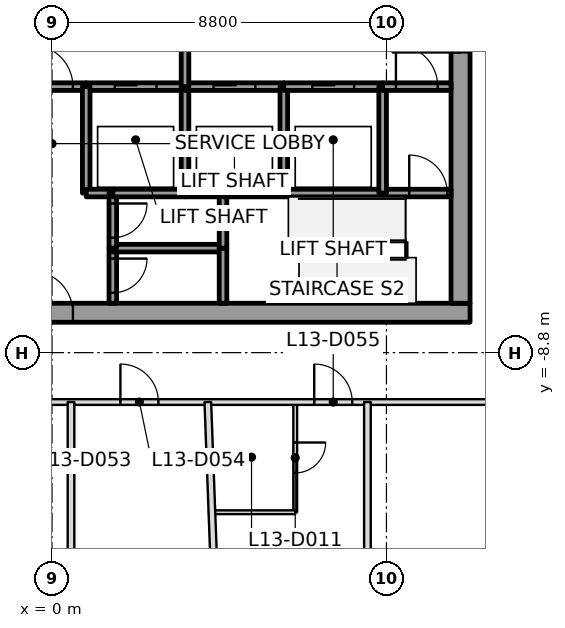
"""IFC4 building model, lengths in metres.
Left out: names, types, materials, properties, quantities, classifications, styles, units other than length and angle.
Written with IfcOpenShell. Run it as: python <this file> out.ifc"""

import sys

from ifc_helpers import new_model, si_unit, direction, frame, frame_2d, origin, place, context, subcontext, project, spatial, rectangle, extrude, element, fill, save


model = new_model("IFC4")
c1 = context("Model", 3, precision=1e-05, world=origin(), true_north=direction((0.0, 1.0)))
c2 = subcontext(c1, "Body", "Model", "MODEL_VIEW")
j1 = project(units=[si_unit("LENGTHUNIT", "METRE"), si_unit("PLANEANGLEUNIT", "RADIAN")], contexts=[c1])
p1 = place(None, origin())
s1 = spatial("IfcSite", under=j1, at=p1, CompositionType="ELEMENT")
p2 = place(p1, origin())
s2 = spatial("IfcBuilding", under=s1, at=p2, CompositionType="ELEMENT")
p3 = place(p2, frame((0.0, 0.0, 70.2)))
s3 = spatial("IfcBuildingStorey", under=s2, at=p3, CompositionType="ELEMENT", Elevation=70.2)
p4 = place(p3, frame((-11.0, -7.75, 0.0), z_axis=(0.0, 0.0, 1.0), x_axis=(1.0, 0.0, 0.0)))
e1 = element("IfcWall", 1, at=p4, inside=s3, PredefinedType="SHEAR", context=c2, shape_type="SweptSolid", body=[
    extrude(rectangle(XDim=22.0, YDim=0.5, at=frame_2d((11.0, 0.0))), origin(), (0.0, 0.0, 1.0), 3.7),
])
p5 = place(p4, frame((10.45, 0.0, 0.0)))
e2 = element("IfcOpeningElement", 2, at=p5, cuts=e1, PredefinedType="OPENING", context=c2, shape_type="SweptSolid", body=[
    extrude(rectangle(XDim=1.1, YDim=2.1, at=frame_2d((0.55, 1.05))), frame((0.0, 0.25, 0.0), z_axis=(0.0, -1.0, 0.0), x_axis=(1.0, 0.0, 0.0)), (0.0, 0.0, 1.0), 0.5),
])
p6 = place(p3, frame((10.75, -7.5, 0.0), z_axis=(0.0, 0.0, 1.0), x_axis=(0.0, 1.0, 0.0)))
e3 = element("IfcWall", 3, at=p6, inside=s3, PredefinedType="SHEAR", context=c2, shape_type="SweptSolid", body=[
    extrude(rectangle(XDim=15.0, YDim=0.5, at=frame_2d((7.5, 0.0))), origin(), (0.0, 0.0, 1.0), 3.7),
])
p7 = place(p6, frame((6.6, 0.0, 0.0)))
e4 = element("IfcOpeningElement", 4, at=p7, cuts=e3, PredefinedType="OPENING", context=c2, shape_type="SweptSolid", body=[
    extrude(rectangle(XDim=1.8, YDim=2.1, at=frame_2d((0.9, 1.05))), frame((0.0, 0.25, 0.0), z_axis=(0.0, -1.0, 0.0), x_axis=(1.0, 0.0, 0.0)), (0.0, 0.0, 1.0), 0.5),
])
p8 = place(p3, frame((-0.9, -1.8, 0.0), z_axis=(0.0, 0.0, 1.0), x_axis=(1.0, 0.0, 0.0)))
e5 = element("IfcWall", 5, at=p8, inside=s3, PredefinedType="SOLIDWALL", context=c2, shape_type="SweptSolid", body=[
    extrude(rectangle(XDim=1.8, YDim=0.2, at=frame_2d((0.9, 0.0))), origin(), (0.0, 0.0, 1.0), 3.55),
])
p9 = place(p8, frame((0.35, 0.0, 0.0)))
e6 = element("IfcOpeningElement", 6, at=p9, cuts=e5, PredefinedType="OPENING", context=c2, shape_type="SweptSolid", body=[
    extrude(rectangle(XDim=1.1, YDim=2.1, at=frame_2d((0.55, 1.05))), frame((0.0, 0.1, 0.0), z_axis=(0.0, -1.0, 0.0), x_axis=(1.0, 0.0, 0.0)), (0.0, 0.0, 1.0), 0.2),
])
p10 = place(p3, frame((0.9, -1.8, 0.0), z_axis=(0.0, 0.0, 1.0), x_axis=(1.0, 0.0, 0.0)))
e7 = element("IfcWall", 7, at=p10, inside=s3, PredefinedType="SOLIDWALL", context=c2, shape_type="SweptSolid", body=[
    extrude(rectangle(XDim=2.6, YDim=0.2, at=frame_2d((1.3, 0.0))), origin(), (0.0, 0.0, 1.0), 3.55),
])
p11 = place(p10, frame((0.75, 0.0, 0.0)))
e8 = element("IfcOpeningElement", 8, at=p11, cuts=e7, PredefinedType="OPENING", context=c2, shape_type="SweptSolid", body=[
    extrude(rectangle(XDim=1.1, YDim=2.1, at=frame_2d((0.55, 1.05))), frame((0.0, 0.1, 0.0), z_axis=(0.0, -1.0, 0.0), x_axis=(1.0, 0.0, 0.0)), (0.0, 0.0, 1.0), 0.2),
])
p12 = place(p3, frame((0.9, -1.8, 0.0), z_axis=(0.0, 0.0, 1.0), x_axis=(0.0, -1.0, 0.0)))
e9 = element("IfcWall", 9, at=p12, inside=s3, PredefinedType="SOLIDWALL", context=c2, shape_type="SweptSolid", body=[
    extrude(rectangle(XDim=2.8, YDim=0.2, at=frame_2d((1.4, 0.0))), origin(), (0.0, 0.0, 1.0), 3.55),
])
p13 = place(p3, frame((0.9, -4.6, 0.0), z_axis=(0.0, 0.0, 1.0), x_axis=(1.0, 0.0, 0.0)))
e10 = element("IfcWall", 10, at=p13, inside=s3, PredefinedType="SOLIDWALL", context=c2, shape_type="SweptSolid", body=[
    extrude(rectangle(XDim=0.7, YDim=0.2, at=frame_2d((0.35, 0.0))), origin(), (0.0, 0.0, 1.0), 3.55),
])
p14 = place(p3, frame((1.6, -6.05, 0.0), z_axis=(0.0, 0.0, 1.0), x_axis=(0.0, -1.0, 0.0)))
e11 = element("IfcWall", 11, at=p14, inside=s3, PredefinedType="SOLIDWALL", context=c2, shape_type="SweptSolid", body=[
    extrude(rectangle(XDim=1.45, YDim=0.2, at=frame_2d((0.725, 0.0))), origin(), (0.0, 0.0, 1.0), 3.55),
])
p15 = place(p14, frame((0.275, 0.0, 0.0)))
e12 = element("IfcOpeningElement", 12, at=p15, cuts=e11, PredefinedType="OPENING", context=c2, shape_type="SweptSolid", body=[
    extrude(rectangle(XDim=0.9, YDim=2.1, at=frame_2d((0.45, 1.05))), frame((0.0, 0.1, 0.0), z_axis=(0.0, -1.0, 0.0), x_axis=(1.0, 0.0, 0.0)), (0.0, 0.0, 1.0), 0.2),
])
p16 = place(p3, frame((4.5, -6.05, 0.0), z_axis=(0.0, 0.0, 1.0), x_axis=(-1.0, 0.0, 0.0)))
e13 = element("IfcWall", 13, at=p16, inside=s3, PredefinedType="SOLIDWALL", context=c2, shape_type="SweptSolid", body=[
    extrude(rectangle(XDim=2.9, YDim=0.2, at=frame_2d((1.45, 0.0))), origin(), (0.0, 0.0, 1.0), 3.55),
])
p17 = place(p3, frame((1.6, -4.6, 0.0), z_axis=(0.0, 0.0, 1.0), x_axis=(0.0, -1.0, 0.0)))
e14 = element("IfcWall", 14, at=p17, inside=s3, PredefinedType="SOLIDWALL", context=c2, shape_type="SweptSolid", body=[
    extrude(rectangle(XDim=1.45, YDim=0.2, at=frame_2d((0.725, 0.0))), origin(), (0.0, 0.0, 1.0), 3.55),
])
p18 = place(p17, frame((0.275, 0.0, 0.0)))
e15 = element("IfcOpeningElement", 15, at=p18, cuts=e14, PredefinedType="OPENING", context=c2, shape_type="SweptSolid", body=[
    extrude(rectangle(XDim=0.9, YDim=2.1, at=frame_2d((0.45, 1.05))), frame((0.0, 0.1, 0.0), z_axis=(0.0, -1.0, 0.0), x_axis=(1.0, 0.0, 0.0)), (0.0, 0.0, 1.0), 0.2),
])
p19 = place(p3, frame((3.5, -4.6, 0.0), z_axis=(0.0, 0.0, 1.0), x_axis=(-1.0, 0.0, 0.0)))
e16 = element("IfcWall", 16, at=p19, inside=s3, PredefinedType="SOLIDWALL", context=c2, shape_type="SweptSolid", body=[
    extrude(rectangle(XDim=1.9, YDim=0.2, at=frame_2d((0.95, 0.0))), origin(), (0.0, 0.0, 1.0), 3.55),
])
p20 = place(p3, frame((4.5, -4.6, 0.0), z_axis=(0.0, 0.0, 1.0), x_axis=(-1.0, 0.0, 0.0)))
e17 = element("IfcWall", 17, at=p20, inside=s3, PredefinedType="SOLIDWALL", context=c2, shape_type="SweptSolid", body=[
    extrude(rectangle(XDim=1.0, YDim=0.2, at=frame_2d((0.5, 0.0))), origin(), (0.0, 0.0, 1.0), 3.55),
])
p21 = place(p3, frame((3.5, -4.6, 0.0), z_axis=(0.0, 0.0, 1.0), x_axis=(0.0, 1.0, 0.0)))
e18 = element("IfcWall", 18, at=p21, inside=s3, PredefinedType="SOLIDWALL", context=c2, shape_type="SweptSolid", body=[
    extrude(rectangle(XDim=2.8, YDim=0.2, at=frame_2d((1.4, 0.0))), origin(), (0.0, 0.0, 1.0), 3.55),
])
p22 = place(p3, frame((3.5, -1.8, 0.0), z_axis=(0.0, 0.0, 1.0), x_axis=(1.0, 0.0, 0.0)))
e19 = element("IfcWall", 19, at=p22, inside=s3, PredefinedType="SOLIDWALL", context=c2, shape_type="SweptSolid", body=[
    extrude(rectangle(XDim=2.6, YDim=0.2, at=frame_2d((1.3, 0.0))), origin(), (0.0, 0.0, 1.0), 3.55),
])
p23 = place(p22, frame((0.75, 0.0, 0.0)))
e20 = element("IfcOpeningElement", 20, at=p23, cuts=e19, PredefinedType="OPENING", context=c2, shape_type="SweptSolid", body=[
    extrude(rectangle(XDim=1.1, YDim=2.1, at=frame_2d((0.55, 1.05))), frame((0.0, 0.1, 0.0), z_axis=(0.0, -1.0, 0.0), x_axis=(1.0, 0.0, 0.0)), (0.0, 0.0, 1.0), 0.2),
])
p24 = place(p3, frame((3.5, -1.8, 0.0), z_axis=(0.0, 0.0, 1.0), x_axis=(0.0, 1.0, 0.0)))
e21 = element("IfcWall", 21, at=p24, inside=s3, PredefinedType="SOLIDWALL", context=c2, shape_type="SweptSolid", body=[
    extrude(rectangle(XDim=3.6, YDim=0.2, at=frame_2d((1.8, 0.0))), origin(), (0.0, 0.0, 1.0), 3.55),
])
p25 = place(p24, frame((1.05, 0.0, 0.0)))
e22 = element("IfcOpeningElement", 22, at=p25, cuts=e21, PredefinedType="OPENING", context=c2, shape_type="SweptSolid", body=[
    extrude(rectangle(XDim=1.5, YDim=2.1, at=frame_2d((0.75, 1.05))), frame((0.0, 0.1, 0.0), z_axis=(0.0, -1.0, 0.0), x_axis=(1.0, 0.0, 0.0)), (0.0, 0.0, 1.0), 0.2),
])
for number, where, z_axis, x_axis in (
    (23, (4.5, -7.5, 0.0), (0.0, 0.0, 1.0), (0.0, 1.0, 0.0)),
    (24, (4.5, -6.05, 0.0), (0.0, 0.0, 1.0), (0.0, 1.0, 0.0)),
):
    element("IfcWall", number, at=place(p3, frame(where, z_axis=z_axis, x_axis=x_axis)), inside=s3, PredefinedType="SOLIDWALL", context=c2, shape_type="SweptSolid", body=[
        extrude(rectangle(XDim=1.45, YDim=0.2, at=frame_2d((0.725, 0.0))), origin(), (0.0, 0.0, 1.0), 3.55),
    ])
p26 = place(p3, frame((4.5, -4.6, 0.0), z_axis=(0.0, 0.0, 1.0), x_axis=(1.0, 0.0, 0.0)))
e25 = element("IfcWall", 25, at=p26, inside=s3, PredefinedType="SOLIDWALL", context=c2, shape_type="SweptSolid", body=[
    extrude(rectangle(XDim=1.6, YDim=0.2, at=frame_2d((0.8, 0.0))), origin(), (0.0, 0.0, 1.0), 3.55),
])
p27 = place(p3, frame((6.1, -4.6, 0.0), z_axis=(0.0, 0.0, 1.0), x_axis=(1.0, 0.0, 0.0)))
e26 = element("IfcWall", 26, at=p27, inside=s3, PredefinedType="SOLIDWALL", context=c2, shape_type="SweptSolid", body=[
    extrude(rectangle(XDim=2.6, YDim=0.2, at=frame_2d((1.3, 0.0))), origin(), (0.0, 0.0, 1.0), 3.55),
])
p28 = place(p3, frame((6.1, -4.6, 0.0), z_axis=(0.0, 0.0, 1.0), x_axis=(0.0, 1.0, 0.0)))
e27 = element("IfcWall", 27, at=p28, inside=s3, PredefinedType="SOLIDWALL", context=c2, shape_type="SweptSolid", body=[
    extrude(rectangle(XDim=2.8, YDim=0.2, at=frame_2d((1.4, 0.0))), origin(), (0.0, 0.0, 1.0), 3.55),
])
p29 = place(p3, frame((6.1, -1.8, 0.0), z_axis=(0.0, 0.0, 1.0), x_axis=(1.0, 0.0, 0.0)))
e28 = element("IfcWall", 28, at=p29, inside=s3, PredefinedType="SOLIDWALL", context=c2, shape_type="SweptSolid", body=[
    extrude(rectangle(XDim=2.6, YDim=0.2, at=frame_2d((1.3, 0.0))), origin(), (0.0, 0.0, 1.0), 3.55),
])
p30 = place(p29, frame((0.75, 0.0, 0.0)))
e29 = element("IfcOpeningElement", 29, at=p30, cuts=e28, PredefinedType="OPENING", context=c2, shape_type="SweptSolid", body=[
    extrude(rectangle(XDim=1.1, YDim=2.1, at=frame_2d((0.55, 1.05))), frame((0.0, 0.1, 0.0), z_axis=(0.0, -1.0, 0.0), x_axis=(1.0, 0.0, 0.0)), (0.0, 0.0, 1.0), 0.2),
])
p31 = place(p3, frame((8.7, -4.6, 0.0), z_axis=(0.0, 0.0, 1.0), x_axis=(1.0, 0.0, 0.0)))
e30 = element("IfcWall", 30, at=p31, inside=s3, PredefinedType="SOLIDWALL", context=c2, shape_type="SweptSolid", body=[
    extrude(rectangle(XDim=1.8, YDim=0.2, at=frame_2d((0.9, 0.0))), origin(), (0.0, 0.0, 1.0), 3.55),
])
p32 = place(p31, frame((0.7, 0.0, 0.0)))
e31 = element("IfcOpeningElement", 31, at=p32, cuts=e30, PredefinedType="OPENING", context=c2, shape_type="SweptSolid", body=[
    extrude(rectangle(XDim=1.0, YDim=2.1, at=frame_2d((0.5, 1.05))), frame((0.0, 0.1, 0.0), z_axis=(0.0, -1.0, 0.0), x_axis=(1.0, 0.0, 0.0)), (0.0, 0.0, 1.0), 0.2),
])
p33 = place(p3, frame((8.7, -1.8, 0.0), z_axis=(0.0, 0.0, 1.0), x_axis=(0.0, -1.0, 0.0)))
e32 = element("IfcWall", 32, at=p33, inside=s3, PredefinedType="SOLIDWALL", context=c2, shape_type="SweptSolid", body=[
    extrude(rectangle(XDim=2.8, YDim=0.2, at=frame_2d((1.4, 0.0))), origin(), (0.0, 0.0, 1.0), 3.55),
])
p34 = place(p3, frame((8.7, -1.8, 0.0), z_axis=(0.0, 0.0, 1.0), x_axis=(1.0, 0.0, 0.0)))
e33 = element("IfcWall", 33, at=p34, inside=s3, PredefinedType="SOLIDWALL", context=c2, shape_type="SweptSolid", body=[
    extrude(rectangle(XDim=1.8, YDim=0.2, at=frame_2d((0.9, 0.0))), origin(), (0.0, 0.0, 1.0), 3.55),
])
p35 = place(p34, frame((0.35, 0.0, 0.0)))
e34 = element("IfcOpeningElement", 34, at=p35, cuts=e33, PredefinedType="OPENING", context=c2, shape_type="SweptSolid", body=[
    extrude(rectangle(XDim=1.1, YDim=2.1, at=frame_2d((0.55, 1.05))), frame((0.0, 0.1, 0.0), z_axis=(0.0, -1.0, 0.0), x_axis=(1.0, 0.0, 0.0)), (0.0, 0.0, 1.0), 0.2),
])
p36 = place(p3, frame((0.5, -10.1, 0.0), z_axis=(0.0, 0.0, 1.0), x_axis=(0.0, -1.0, 0.0)))
e35 = element("IfcWall", 35, at=p36, inside=s3, PredefinedType="PARTITIONING", context=c2, shape_type="SweptSolid", body=[
    extrude(rectangle(XDim=13.97, YDim=0.175, at=frame_2d((6.985, 0.0))), origin(), (0.0, 0.0, 1.0), 2.784),
])
p37 = place(p3, frame((4.604, -23.656, 0.0), z_axis=(0.0, 0.0, 1.0), x_axis=(-0.03711217874, 0.999311105807, 0.0)))
e36 = element("IfcWall", 36, at=p37, inside=s3, PredefinedType="PARTITIONING", context=c2, shape_type="SweptSolid", body=[
    extrude(rectangle(XDim=13.565, YDim=0.175, at=frame_2d((6.782, 0.0))), origin(), (0.0, 0.0, 1.0), 2.784),
])
p38 = place(p3, frame((8.3, -10.1, 0.0), z_axis=(0.0, 0.0, 1.0), x_axis=(0.0, -1.0, 0.0)))
e37 = element("IfcWall", 37, at=p38, inside=s3, PredefinedType="PARTITIONING", context=c2, shape_type="SweptSolid", body=[
    extrude(rectangle(XDim=13.665, YDim=0.175, at=frame_2d((6.833, 0.0))), origin(), (0.0, 0.0, 1.0), 2.784),
])
p39 = place(p3, frame((-13.02, -10.1, 0.0), z_axis=(0.0, 0.0, 1.0), x_axis=(1.0, 0.0, 0.0)))
e38 = element("IfcWall", 38, at=p39, inside=s3, PredefinedType="PARTITIONING", context=c2, shape_type="SweptSolid", body=[
    extrude(rectangle(XDim=26.04, YDim=0.15, at=frame_2d((13.02, 0.0))), origin(), (0.0, 0.0, 1.0), 2.797),
])
p40 = place(p39, frame((7.32, 0.0, 0.0)))
e39 = element("IfcOpeningElement", 39, at=p40, cuts=e38, PredefinedType="OPENING", context=c2, shape_type="SweptSolid", body=[
    extrude(rectangle(XDim=1.0, YDim=2.1, at=frame_2d((0.5, 1.05))), frame((0.0, 0.075, 0.0), z_axis=(0.0, -1.0, 0.0), x_axis=(1.0, 0.0, 0.0)), (0.0, 0.0, 1.0), 0.15),
])
p41 = place(p39, frame((11.82, 0.0, 0.0)))
e40 = element("IfcOpeningElement", 40, at=p41, cuts=e38, PredefinedType="OPENING", context=c2, shape_type="SweptSolid", body=[
    extrude(rectangle(XDim=1.0, YDim=2.1, at=frame_2d((0.5, 1.05))), frame((0.0, 0.075, 0.0), z_axis=(0.0, -1.0, 0.0), x_axis=(1.0, 0.0, 0.0)), (0.0, 0.0, 1.0), 0.15),
])
p42 = place(p39, frame((14.82, 0.0, 0.0)))
e41 = element("IfcOpeningElement", 41, at=p42, cuts=e38, PredefinedType="OPENING", context=c2, shape_type="SweptSolid", body=[
    extrude(rectangle(XDim=1.0, YDim=2.1, at=frame_2d((0.5, 1.05))), frame((0.0, 0.075, 0.0), z_axis=(0.0, -1.0, 0.0), x_axis=(1.0, 0.0, 0.0)), (0.0, 0.0, 1.0), 0.15),
])
p43 = place(p39, frame((19.92, 0.0, 0.0)))
e42 = element("IfcOpeningElement", 42, at=p43, cuts=e38, PredefinedType="OPENING", context=c2, shape_type="SweptSolid", body=[
    extrude(rectangle(XDim=1.0, YDim=2.1, at=frame_2d((0.5, 1.05))), frame((0.0, 0.075, 0.0), z_axis=(0.0, -1.0, 0.0), x_axis=(1.0, 0.0, 0.0)), (0.0, 0.0, 1.0), 0.15),
])
p44 = place(p3, frame((6.4, -10.13, 0.0), z_axis=(0.0, 0.0, 1.0), x_axis=(0.0, -1.0, 0.0)))
e43 = element("IfcWall", 43, at=p44, inside=s3, PredefinedType="PARTITIONING", context=c2, shape_type="SweptSolid", body=[
    extrude(rectangle(XDim=2.87, YDim=0.1, at=frame_2d((1.435, 0.0))), origin(), (0.0, 0.0, 1.0), 2.797),
])
p45 = place(p44, frame((1.035, 0.0, 0.0)))
e44 = element("IfcOpeningElement", 44, at=p45, cuts=e43, PredefinedType="OPENING", context=c2, shape_type="SweptSolid", body=[
    extrude(rectangle(XDim=0.8, YDim=2.1, at=frame_2d((0.4, 1.05))), frame((0.0, 0.05, 0.0), z_axis=(0.0, -1.0, 0.0), x_axis=(1.0, 0.0, 0.0)), (0.0, 0.0, 1.0), 0.1),
])
p46 = place(p3, frame((6.4, -13.0, 0.0), z_axis=(0.0, 0.0, 1.0), x_axis=(-1.0, 0.0, 0.0)))
e45 = element("IfcWall", 45, at=p46, inside=s3, PredefinedType="PARTITIONING", context=c2, shape_type="SweptSolid", body=[
    extrude(rectangle(XDim=2.27, YDim=0.1, at=frame_2d((1.135, 0.0))), origin(), (0.0, 0.0, 1.0), 2.797),
])
p47 = place(p42, origin())
e46 = element("IfcDoor", 46, at=p47, inside=s3, OperationType="SINGLE_SWING_LEFT", PredefinedType="DOOR", context=c2, shape_type="SweptSolid", body=[
    extrude(rectangle(XDim=1.0, YDim=2.1, at=frame_2d((0.5, 1.05))), frame((0.0, 0.025, 0.0), z_axis=(0.0, -1.0, 0.0), x_axis=(1.0, 0.0, 0.0)), (0.0, 0.0, 1.0), 0.05),
])
fill(e41, e46)
p48 = place(p43, origin())
e47 = element("IfcDoor", 47, at=p48, inside=s3, OperationType="SINGLE_SWING_LEFT", PredefinedType="DOOR", context=c2, shape_type="SweptSolid", body=[
    extrude(rectangle(XDim=1.0, YDim=2.1, at=frame_2d((0.5, 1.05))), frame((0.0, 0.025, 0.0), z_axis=(0.0, -1.0, 0.0), x_axis=(1.0, 0.0, 0.0)), (0.0, 0.0, 1.0), 0.05),
])
fill(e42, e47)
p49 = place(p45, origin())
e48 = element("IfcDoor", 48, at=p49, inside=s3, OperationType="SINGLE_SWING_LEFT", PredefinedType="DOOR", context=c2, shape_type="SweptSolid", body=[
    extrude(rectangle(XDim=0.8, YDim=2.1, at=frame_2d((0.4, 1.05))), frame((0.0, 0.025, 0.0), z_axis=(0.0, -1.0, 0.0), x_axis=(1.0, 0.0, 0.0)), (0.0, 0.0, 1.0), 0.05),
])
fill(e44, e48)
p50 = place(p11, origin())
e49 = element("IfcDoor", 49, at=p50, inside=s3, OperationType="SLIDING_TO_RIGHT", PredefinedType="DOOR", context=c2, shape_type="SweptSolid", body=[
    extrude(rectangle(XDim=1.1, YDim=2.1, at=frame_2d((0.55, 1.05))), frame((0.0, 0.025, 0.0), z_axis=(0.0, -1.0, 0.0), x_axis=(1.0, 0.0, 0.0)), (0.0, 0.0, 1.0), 0.05),
])
fill(e8, e49)
p51 = place(p23, origin())
e50 = element("IfcDoor", 50, at=p51, inside=s3, OperationType="SLIDING_TO_LEFT", PredefinedType="DOOR", context=c2, shape_type="SweptSolid", body=[
    extrude(rectangle(XDim=1.1, YDim=2.1, at=frame_2d((0.55, 1.05))), frame((0.0, 0.025, 0.0), z_axis=(0.0, -1.0, 0.0), x_axis=(1.0, 0.0, 0.0)), (0.0, 0.0, 1.0), 0.05),
])
fill(e20, e50)
p52 = place(p30, origin())
e51 = element("IfcDoor", 51, at=p52, inside=s3, OperationType="SLIDING_TO_LEFT", PredefinedType="DOOR", context=c2, shape_type="SweptSolid", body=[
    extrude(rectangle(XDim=1.1, YDim=2.1, at=frame_2d((0.55, 1.05))), frame((0.0, 0.025, 0.0), z_axis=(0.0, -1.0, 0.0), x_axis=(1.0, 0.0, 0.0)), (0.0, 0.0, 1.0), 0.05),
])
fill(e29, e51)
p53 = place(p35, origin())
e52 = element("IfcDoor", 52, at=p53, inside=s3, OperationType="SINGLE_SWING_LEFT", PredefinedType="DOOR", context=c2, shape_type="SweptSolid", body=[
    extrude(rectangle(XDim=1.1, YDim=2.1, at=frame_2d((0.55, 1.05))), frame((0.0, 0.025, 0.0), z_axis=(0.0, -1.0, 0.0), x_axis=(1.0, 0.0, 0.0)), (0.0, 0.0, 1.0), 0.05),
])
fill(e34, e52)
p54 = place(p9, origin())
e53 = element("IfcDoor", 53, at=p54, inside=s3, OperationType="SINGLE_SWING_LEFT", PredefinedType="DOOR", context=c2, shape_type="SweptSolid", body=[
    extrude(rectangle(XDim=1.1, YDim=2.1, at=frame_2d((0.55, 1.05))), frame((0.0, 0.025, 0.0), z_axis=(0.0, -1.0, 0.0), x_axis=(1.0, 0.0, 0.0)), (0.0, 0.0, 1.0), 0.05),
])
fill(e6, e53)
p55 = place(p32, origin())
e54 = element("IfcDoor", 54, at=p55, inside=s3, OperationType="SINGLE_SWING_RIGHT", PredefinedType="DOOR", context=c2, shape_type="SweptSolid", body=[
    extrude(rectangle(XDim=1.0, YDim=2.1, at=frame_2d((0.5, 1.05))), frame((0.0, 0.025, 0.0), z_axis=(0.0, -1.0, 0.0), x_axis=(1.0, 0.0, 0.0)), (0.0, 0.0, 1.0), 0.05),
])
fill(e31, e54)
p56 = place(p15, origin())
e55 = element("IfcDoor", 55, at=p56, inside=s3, OperationType="SINGLE_SWING_LEFT", PredefinedType="DOOR", context=c2, shape_type="SweptSolid", body=[
    extrude(rectangle(XDim=0.9, YDim=2.1, at=frame_2d((0.45, 1.05))), frame((0.0, 0.025, 0.0), z_axis=(0.0, -1.0, 0.0), x_axis=(1.0, 0.0, 0.0)), (0.0, 0.0, 1.0), 0.05),
])
fill(e12, e55)
p57 = place(p18, origin())
e56 = element("IfcDoor", 56, at=p57, inside=s3, OperationType="SINGLE_SWING_LEFT", PredefinedType="DOOR", context=c2, shape_type="SweptSolid", body=[
    extrude(rectangle(XDim=0.9, YDim=2.1, at=frame_2d((0.45, 1.05))), frame((0.0, 0.025, 0.0), z_axis=(0.0, -1.0, 0.0), x_axis=(1.0, 0.0, 0.0)), (0.0, 0.0, 1.0), 0.05),
])
fill(e15, e56)
p58 = place(p7, origin())
e57 = element("IfcDoor", 57, at=p58, inside=s3, OperationType="DOUBLE_DOOR_SINGLE_SWING", PredefinedType="DOOR", context=c2, shape_type="SweptSolid", body=[
    extrude(rectangle(XDim=1.8, YDim=2.1, at=frame_2d((0.9, 1.05))), frame((0.0, 0.025, 0.0), z_axis=(0.0, -1.0, 0.0), x_axis=(1.0, 0.0, 0.0)), (0.0, 0.0, 1.0), 0.05),
])
fill(e4, e57)
p59 = place(p5, origin())
e58 = element("IfcDoor", 58, at=p59, inside=s3, OperationType="SINGLE_SWING_RIGHT", PredefinedType="DOOR", context=c2, shape_type="SweptSolid", body=[
    extrude(rectangle(XDim=1.1, YDim=2.1, at=frame_2d((0.55, 1.05))), frame((0.0, 0.025, 0.0), z_axis=(0.0, -1.0, 0.0), x_axis=(1.0, 0.0, 0.0)), (0.0, 0.0, 1.0), 0.05),
])
fill(e2, e58)
save(model, sys.argv[1])
